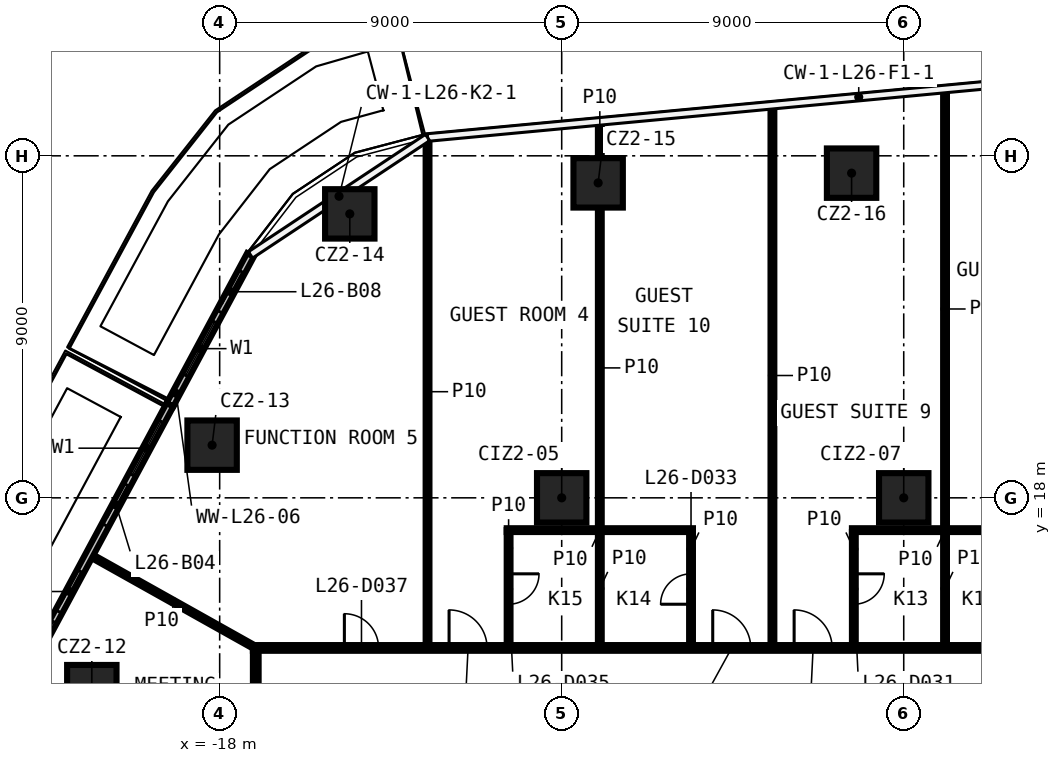
"""IFC4 building model, lengths in metres.
Left out: names, types, materials, properties, quantities, classifications, styles, units other than length and angle.
Written with IfcOpenShell. Run it as: python <this file> out.ifc"""

import sys

from ifc_helpers import new_model, si_unit, direction, frame, frame_2d, origin, origin_2d, place, context, subcontext, project, spatial, rectangle, extrude, element, fill, save


model = new_model("IFC4")
c1 = context("Model", 3, precision=1e-05, world=origin(), true_north=direction((0.0, 1.0)))
c2 = subcontext(c1, "Body", "Model", "MODEL_VIEW")
j1 = project(units=[si_unit("LENGTHUNIT", "METRE"), si_unit("PLANEANGLEUNIT", "RADIAN")], contexts=[c1])
p1 = place(None, origin())
s1 = spatial("IfcSite", under=j1, at=p1, CompositionType="ELEMENT")
p2 = place(p1, origin())
s2 = spatial("IfcBuilding", under=s1, at=p2, CompositionType="ELEMENT")
p3 = place(p2, frame((0.0, 0.0, 121.1)))
s3 = spatial("IfcBuildingStorey", under=s2, at=p3, CompositionType="ELEMENT", Elevation=121.1)
for number, where, z_axis, x_axis in (
    (1, (-21.364, 12.952, 0.0), (0.0, 0.0, 1.0), (1.0, 0.0, 0.0)),
    (2, (-18.199, 19.386, 0.0), (0.0, 0.0, 1.0), (1.0, 0.0, 0.0)),
    (3, (-14.576, 25.472, 0.0), (0.0, 0.0, 1.0), (1.0, 0.0, 0.0)),
    (4, (-8.041, 26.288, 0.0), (0.0, 0.0, 1.0), (1.0, 0.0, 0.0)),
    (5, (-1.372, 26.544, 0.0), (0.0, 0.0, 1.0), (1.0, 0.0, 0.0)),
    (6, (-9.0, 18.0, 0.0), (0.0, 0.0, 1.0), (1.0, 0.0, 0.0)),
    (7, (0.0, 18.0, 0.0), (0.0, 0.0, 1.0), (1.0, 0.0, 0.0)),
):
    element("IfcColumn", number, at=place(p3, frame(where, z_axis=z_axis, x_axis=x_axis)), inside=s3, PredefinedType="COLUMN", context=c2, shape_type="SweptSolid", body=[
        extrude(rectangle(XDim=1.3, YDim=1.3, at=origin_2d()), origin(), (0.0, 0.0, 1.0), 3.3),
    ])
p4 = place(p3, frame((-17.125, 14.05, 0.0), z_axis=(0.0, 0.0, 1.0), x_axis=(1.0, 0.0, 0.0)))
e8 = element("IfcWall", 8, at=p4, inside=s3, PredefinedType="PARTITIONING", context=c2, shape_type="SweptSolid", body=[
    extrude(rectangle(XDim=34.25, YDim=0.15, at=frame_2d((17.125, 0.0))), origin(), (0.0, 0.0, 1.0), 3.3),
])
p5 = place(p4, frame((30.377, 0.0, 0.0)))
e9 = element("IfcOpeningElement", 9, at=p5, cuts=e8, PredefinedType="OPENING", context=c2, shape_type="SweptSolid", body=[
    extrude(rectangle(XDim=0.9, YDim=2.1, at=frame_2d((0.45, 1.05))), frame((0.0, 0.085, 0.0), z_axis=(0.0, -1.0, 0.0), x_axis=(1.0, 0.0, 0.0)), (0.0, 0.0, 1.0), 0.17),
])
p6 = place(p4, frame((23.321, 0.0, 0.0)))
e10 = element("IfcOpeningElement", 10, at=p6, cuts=e8, PredefinedType="OPENING", context=c2, shape_type="SweptSolid", body=[
    extrude(rectangle(XDim=1.0, YDim=2.1, at=frame_2d((0.5, 1.05))), frame((0.0, 0.085, 0.0), z_axis=(0.0, -1.0, 0.0), x_axis=(1.0, 0.0, 0.0)), (0.0, 0.0, 1.0), 0.17),
])
p7 = place(p4, frame((21.183, 0.0, 0.0)))
e11 = element("IfcOpeningElement", 11, at=p7, cuts=e8, PredefinedType="OPENING", context=c2, shape_type="SweptSolid", body=[
    extrude(rectangle(XDim=1.0, YDim=2.1, at=frame_2d((0.5, 1.05))), frame((0.0, 0.085, 0.0), z_axis=(0.0, -1.0, 0.0), x_axis=(1.0, 0.0, 0.0)), (0.0, 0.0, 1.0), 0.17),
])
p8 = place(p4, frame((14.241, 0.0, 0.0)))
e12 = element("IfcOpeningElement", 12, at=p8, cuts=e8, PredefinedType="OPENING", context=c2, shape_type="SweptSolid", body=[
    extrude(rectangle(XDim=1.0, YDim=2.1, at=frame_2d((0.5, 1.05))), frame((0.0, 0.085, 0.0), z_axis=(0.0, -1.0, 0.0), x_axis=(1.0, 0.0, 0.0)), (0.0, 0.0, 1.0), 0.17),
])
p9 = place(p4, frame((12.099, 0.0, 0.0)))
e13 = element("IfcOpeningElement", 13, at=p9, cuts=e8, PredefinedType="OPENING", context=c2, shape_type="SweptSolid", body=[
    extrude(rectangle(XDim=1.0, YDim=2.1, at=frame_2d((0.5, 1.05))), frame((0.0, 0.085, 0.0), z_axis=(0.0, -1.0, 0.0), x_axis=(1.0, 0.0, 0.0)), (0.0, 0.0, 1.0), 0.17),
])
p10 = place(p4, frame((5.161, 0.0, 0.0)))
e14 = element("IfcOpeningElement", 14, at=p10, cuts=e8, PredefinedType="OPENING", context=c2, shape_type="SweptSolid", body=[
    extrude(rectangle(XDim=1.0, YDim=2.1, at=frame_2d((0.5, 1.05))), frame((0.0, 0.085, 0.0), z_axis=(0.0, -1.0, 0.0), x_axis=(1.0, 0.0, 0.0)), (0.0, 0.0, 1.0), 0.17),
])
p11 = place(p4, frame((2.406, 0.0, 0.0)))
e15 = element("IfcOpeningElement", 15, at=p11, cuts=e8, PredefinedType="OPENING", context=c2, shape_type="SweptSolid", body=[
    extrude(rectangle(XDim=0.9, YDim=2.1, at=frame_2d((0.45, 1.05))), frame((0.0, 0.085, 0.0), z_axis=(0.0, -1.0, 0.0), x_axis=(1.0, 0.0, 0.0)), (0.0, 0.0, 1.0), 0.17),
])
p12 = place(p3, frame((-10.447, 17.15, 0.0), z_axis=(0.0, 0.0, 1.0), x_axis=(1.0, 0.0, 0.0)))
e16 = element("IfcWall", 16, at=p12, inside=s3, PredefinedType="PARTITIONING", context=c2, shape_type="SweptSolid", body=[
    extrude(rectangle(XDim=4.9, YDim=0.1, at=frame_2d((2.45, 0.0))), origin(), (0.0, 0.0, 1.0), 3.3),
])
p13 = place(p3, frame((-1.363, 17.15, 0.0), z_axis=(0.0, 0.0, 1.0), x_axis=(1.0, 0.0, 0.0)))
e17 = element("IfcWall", 17, at=p13, inside=s3, PredefinedType="PARTITIONING", context=c2, shape_type="SweptSolid", body=[
    extrude(rectangle(XDim=4.9, YDim=0.1, at=frame_2d((2.45, 0.0))), origin(), (0.0, 0.0, 1.0), 3.3),
])
p14 = place(p3, frame((1.087, 14.125, 0.0), z_axis=(0.0, 0.0, 1.0), x_axis=(0.0, 1.0, 0.0)))
e18 = element("IfcWall", 18, at=p14, inside=s3, PredefinedType="PARTITIONING", context=c2, shape_type="SweptSolid", body=[
    extrude(rectangle(XDim=2.975, YDim=0.1, at=frame_2d((1.488, 0.0))), origin(), (0.0, 0.0, 1.0), 3.3),
])
p15 = place(p3, frame((1.087, 17.2, 0.0), z_axis=(0.0, 0.0, 1.0), x_axis=(0.0, 1.0, 0.0)))
e19 = element("IfcWall", 19, at=p15, inside=s3, PredefinedType="PARTITIONING", context=c2, shape_type="SweptSolid", body=[
    extrude(rectangle(XDim=11.539, YDim=0.1, at=frame_2d((5.77, 0.0))), origin(), (0.0, 0.0, 1.0), 3.3),
])
p16 = place(p3, frame((-1.313, 17.1, 0.0), z_axis=(0.0, 0.0, 1.0), x_axis=(0.0, -1.0, 0.0)))
e20 = element("IfcWall", 20, at=p16, inside=s3, PredefinedType="PARTITIONING", context=c2, shape_type="SweptSolid", body=[
    extrude(rectangle(XDim=2.975, YDim=0.1, at=frame_2d((1.488, 0.0))), origin(), (0.0, 0.0, 1.0), 3.3),
])
p17 = place(p16, frame((1.1, 0.0, 0.0)))
e21 = element("IfcOpeningElement", 21, at=p17, cuts=e20, PredefinedType="OPENING", context=c2, shape_type="SweptSolid", body=[
    extrude(rectangle(XDim=0.8, YDim=2.1, at=frame_2d((0.4, 1.05))), frame((0.0, 0.06, 0.0), z_axis=(0.0, -1.0, 0.0), x_axis=(1.0, 0.0, 0.0)), (0.0, 0.0, 1.0), 0.12),
])
p18 = place(p3, frame((-3.455, 14.125, 0.0), z_axis=(0.0, 0.0, 1.0), x_axis=(0.0, 1.0, 0.0)))
e22 = element("IfcWall", 22, at=p18, inside=s3, PredefinedType="PARTITIONING", context=c2, shape_type="SweptSolid", body=[
    extrude(rectangle(XDim=14.188, YDim=0.1, at=frame_2d((7.094, 0.0))), origin(), (0.0, 0.0, 1.0), 3.3),
])
p19 = place(p3, frame((-5.597, 14.125, 0.0), z_axis=(0.0, 0.0, 1.0), x_axis=(0.0, 1.0, 0.0)))
e23 = element("IfcWall", 23, at=p19, inside=s3, PredefinedType="PARTITIONING", context=c2, shape_type="SweptSolid", body=[
    extrude(rectangle(XDim=2.975, YDim=0.1, at=frame_2d((1.488, 0.0))), origin(), (0.0, 0.0, 1.0), 3.3),
])
p20 = place(p19, frame((1.075, 0.0, 0.0)))
e24 = element("IfcOpeningElement", 24, at=p20, cuts=e23, PredefinedType="OPENING", context=c2, shape_type="SweptSolid", body=[
    extrude(rectangle(XDim=0.8, YDim=2.1, at=frame_2d((0.4, 1.05))), frame((0.0, 0.06, 0.0), z_axis=(0.0, -1.0, 0.0), x_axis=(1.0, 0.0, 0.0)), (0.0, 0.0, 1.0), 0.12),
])
p21 = place(p3, frame((-7.997, 14.125, 0.0), z_axis=(0.0, 0.0, 1.0), x_axis=(0.0, 1.0, 0.0)))
e25 = element("IfcWall", 25, at=p21, inside=s3, PredefinedType="PARTITIONING", context=c2, shape_type="SweptSolid", body=[
    extrude(rectangle(XDim=2.975, YDim=0.1, at=frame_2d((1.488, 0.0))), origin(), (0.0, 0.0, 1.0), 3.3),
])
p22 = place(p3, frame((-7.997, 17.2, 0.0), z_axis=(0.0, 0.0, 1.0), x_axis=(0.0, 1.0, 0.0)))
e26 = element("IfcWall", 26, at=p22, inside=s3, PredefinedType="PARTITIONING", context=c2, shape_type="SweptSolid", body=[
    extrude(rectangle(XDim=8.438, YDim=0.1, at=frame_2d((4.219, 0.0))), origin(), (0.0, 0.0, 1.0), 3.3),
])
p23 = place(p3, frame((-7.997, 26.938, 0.0), z_axis=(0.0, 0.0, 1.0), x_axis=(0.0, 1.0, 0.0)))
e27 = element("IfcWall", 27, at=p23, inside=s3, PredefinedType="PARTITIONING", context=c2, shape_type="SweptSolid", body=[
    extrude(rectangle(XDim=0.949, YDim=0.1, at=frame_2d((0.474, 0.0))), origin(), (0.0, 0.0, 1.0), 3.3),
])
p24 = place(p3, frame((-10.397, 17.15, 0.0), z_axis=(0.0, 0.0, 1.0), x_axis=(0.0, -1.0, 0.0)))
e28 = element("IfcWall", 28, at=p24, inside=s3, PredefinedType="PARTITIONING", context=c2, shape_type="SweptSolid", body=[
    extrude(rectangle(XDim=3.025, YDim=0.1, at=frame_2d((1.512, 0.0))), origin(), (0.0, 0.0, 1.0), 3.3),
])
p25 = place(p24, frame((1.15, 0.0, 0.0)))
e29 = element("IfcOpeningElement", 29, at=p25, cuts=e28, PredefinedType="OPENING", context=c2, shape_type="SweptSolid", body=[
    extrude(rectangle(XDim=0.8, YDim=2.1, at=frame_2d((0.4, 1.05))), frame((0.0, 0.06, 0.0), z_axis=(0.0, -1.0, 0.0), x_axis=(1.0, 0.0, 0.0)), (0.0, 0.0, 1.0), 0.12),
])
p26 = place(p3, frame((-12.53, 14.125, 0.0), z_axis=(0.0, 0.0, 1.0), x_axis=(0.0, 1.0, 0.0)))
e30 = element("IfcWall", 30, at=p26, inside=s3, PredefinedType="PARTITIONING", context=c2, shape_type="SweptSolid", body=[
    extrude(rectangle(XDim=13.336, YDim=0.1, at=frame_2d((6.668, 0.0))), origin(), (0.0, 0.0, 1.0), 3.3),
])
p27 = place(p3, frame((-17.05, -13.975, 0.0), z_axis=(0.0, 0.0, 1.0), x_axis=(0.0, 1.0, 0.0)))
e31 = element("IfcWall", 31, at=p27, inside=s3, PredefinedType="PARTITIONING", context=c2, shape_type="SweptSolid", body=[
    extrude(rectangle(XDim=27.95, YDim=0.15, at=frame_2d((13.975, 0.0))), origin(), (0.0, 0.0, 1.0), 3.3),
])
p28 = place(p27, frame((11.186, 0.0, 0.0)))
e32 = element("IfcOpeningElement", 32, at=p28, cuts=e31, PredefinedType="OPENING", context=c2, shape_type="SweptSolid", body=[
    extrude(rectangle(XDim=0.9, YDim=2.1, at=frame_2d((0.45, 1.05))), frame((0.0, 0.085, 0.0), z_axis=(0.0, -1.0, 0.0), x_axis=(1.0, 0.0, 0.0)), (0.0, 0.0, 1.0), 0.17),
])
p29 = place(p27, frame((8.404, 0.0, 0.0)))
e33 = element("IfcOpeningElement", 33, at=p29, cuts=e31, PredefinedType="OPENING", context=c2, shape_type="SweptSolid", body=[
    extrude(rectangle(XDim=0.9, YDim=2.1, at=frame_2d((0.45, 1.05))), frame((0.0, 0.085, 0.0), z_axis=(0.0, -1.0, 0.0), x_axis=(1.0, 0.0, 0.0)), (0.0, 0.0, 1.0), 0.17),
])
p30 = place(p27, frame((1.58, 0.0, 0.0)))
e34 = element("IfcOpeningElement", 34, at=p30, cuts=e31, PredefinedType="OPENING", context=c2, shape_type="SweptSolid", body=[
    extrude(rectangle(XDim=0.9, YDim=2.1, at=frame_2d((0.45, 1.05))), frame((0.0, 0.085, 0.0), z_axis=(0.0, -1.0, 0.0), x_axis=(1.0, 0.0, 0.0)), (0.0, 0.0, 1.0), 0.17),
])
p31 = place(p27, frame((24.871, 0.0, 0.0)))
e35 = element("IfcOpeningElement", 35, at=p31, cuts=e31, PredefinedType="OPENING", context=c2, shape_type="SweptSolid", body=[
    extrude(rectangle(XDim=0.9, YDim=2.1, at=frame_2d((0.45, 1.05))), frame((0.0, 0.085, 0.0), z_axis=(0.0, -1.0, 0.0), x_axis=(1.0, 0.0, 0.0)), (0.0, 0.0, 1.0), 0.17),
])
p32 = place(p27, frame((20.159, 0.0, 0.0)))
e36 = element("IfcOpeningElement", 36, at=p32, cuts=e31, PredefinedType="OPENING", context=c2, shape_type="SweptSolid", body=[
    extrude(rectangle(XDim=0.9, YDim=2.1, at=frame_2d((0.45, 1.05))), frame((0.0, 0.085, 0.0), z_axis=(0.0, -1.0, 0.0), x_axis=(1.0, 0.0, 0.0)), (0.0, 0.0, 1.0), 0.17),
])
p33 = place(p27, frame((16.211, 0.0, 0.0)))
e37 = element("IfcOpeningElement", 37, at=p33, cuts=e31, PredefinedType="OPENING", context=c2, shape_type="SweptSolid", body=[
    extrude(rectangle(XDim=0.9, YDim=2.1, at=frame_2d((0.45, 1.05))), frame((0.0, 0.085, 0.0), z_axis=(0.0, -1.0, 0.0), x_axis=(1.0, 0.0, 0.0)), (0.0, 0.0, 1.0), 0.17),
])
p34 = place(p3, frame((-21.411, 16.494, 0.0), z_axis=(0.0, 0.0, 1.0), x_axis=(0.872342728858, -0.488894838803, 0.0)))
e38 = element("IfcWall", 38, at=p34, inside=s3, PredefinedType="PARTITIONING", context=c2, shape_type="SweptSolid", body=[
    extrude(rectangle(XDim=4.999, YDim=0.1, at=frame_2d((2.5, 0.0))), origin(), (0.0, 0.0, 1.0), 3.3),
])
p35 = place(p3, frame((-19.306, 20.451, 0.0), z_axis=(0.0, 0.0, 1.0), x_axis=(-0.473410228211, -0.880842072011, 0.0)))
e39 = element("IfcWall", 39, at=p35, inside=s3, PredefinedType="SOLIDWALL", context=c2, shape_type="SweptSolid", body=[
    extrude(rectangle(XDim=17.928, YDim=0.2, at=frame_2d((8.964, 0.0))), origin(), (0.0, 0.0, 1.0), 3.3),
])
p36 = place(p35, frame((0.5, 0.0, 0.6)))
e40 = element("IfcOpeningElement", 40, at=p36, cuts=e39, PredefinedType="OPENING", context=c2, shape_type="SweptSolid", body=[
    extrude(rectangle(XDim=1.6, YDim=2.4, at=frame_2d((0.8, 1.2))), frame((0.0, 0.11, 0.0), z_axis=(0.0, -1.0, 0.0), x_axis=(1.0, 0.0, 0.0)), (0.0, 0.0, 1.0), 0.22),
])
p37 = place(p35, frame((2.4, 0.0, 0.0)))
e41 = element("IfcOpeningElement", 41, at=p37, cuts=e39, PredefinedType="OPENING", context=c2, shape_type="SweptSolid", body=[
    extrude(rectangle(XDim=1.2, YDim=2.4, at=frame_2d((0.6, 1.2))), frame((0.0, 0.11, 0.0), z_axis=(0.0, -1.0, 0.0), x_axis=(1.0, 0.0, 0.0)), (0.0, 0.0, 1.0), 0.22),
])
p38 = place(p35, frame((6.482, 0.0, 0.6)))
e42 = element("IfcOpeningElement", 42, at=p38, cuts=e39, PredefinedType="OPENING", context=c2, shape_type="SweptSolid", body=[
    extrude(rectangle(XDim=1.6, YDim=2.4, at=frame_2d((0.8, 1.2))), frame((0.0, 0.11, 0.0), z_axis=(0.0, -1.0, 0.0), x_axis=(1.0, 0.0, 0.0)), (0.0, 0.0, 1.0), 0.22),
])
p39 = place(p35, frame((4.982, 0.0, 0.0)))
e43 = element("IfcOpeningElement", 43, at=p39, cuts=e39, PredefinedType="OPENING", context=c2, shape_type="SweptSolid", body=[
    extrude(rectangle(XDim=1.2, YDim=2.4, at=frame_2d((0.6, 1.2))), frame((0.0, 0.11, 0.0), z_axis=(0.0, -1.0, 0.0), x_axis=(1.0, 0.0, 0.0)), (0.0, 0.0, 1.0), 0.22),
])
p40 = place(p35, frame((10.964, 0.0, 0.6)))
e44 = element("IfcOpeningElement", 44, at=p40, cuts=e39, PredefinedType="OPENING", context=c2, shape_type="SweptSolid", body=[
    extrude(rectangle(XDim=1.6, YDim=2.4, at=frame_2d((0.8, 1.2))), frame((0.0, 0.11, 0.0), z_axis=(0.0, -1.0, 0.0), x_axis=(1.0, 0.0, 0.0)), (0.0, 0.0, 1.0), 0.22),
])
p41 = place(p35, frame((9.464, 0.0, 0.0)))
e45 = element("IfcOpeningElement", 45, at=p41, cuts=e39, PredefinedType="OPENING", context=c2, shape_type="SweptSolid", body=[
    extrude(rectangle(XDim=1.2, YDim=2.4, at=frame_2d((0.6, 1.2))), frame((0.0, 0.11, 0.0), z_axis=(0.0, -1.0, 0.0), x_axis=(1.0, 0.0, 0.0)), (0.0, 0.0, 1.0), 0.22),
])
p42 = place(p35, frame((13.946, 0.0, 0.6)))
e46 = element("IfcOpeningElement", 46, at=p42, cuts=e39, PredefinedType="OPENING", context=c2, shape_type="SweptSolid", body=[
    extrude(rectangle(XDim=1.6, YDim=2.4, at=frame_2d((0.8, 1.2))), frame((0.0, 0.11, 0.0), z_axis=(0.0, -1.0, 0.0), x_axis=(1.0, 0.0, 0.0)), (0.0, 0.0, 1.0), 0.22),
])
p43 = place(p35, frame((15.846, 0.0, 0.0)))
e47 = element("IfcOpeningElement", 47, at=p43, cuts=e39, PredefinedType="OPENING", context=c2, shape_type="SweptSolid", body=[
    extrude(rectangle(XDim=1.2, YDim=2.4, at=frame_2d((0.6, 1.2))), frame((0.0, 0.11, 0.0), z_axis=(0.0, -1.0, 0.0), x_axis=(1.0, 0.0, 0.0)), (0.0, 0.0, 1.0), 0.22),
])
p44 = place(p3, frame((-17.188, 24.392, 0.0), z_axis=(0.0, 0.0, 1.0), x_axis=(-0.473387015207, -0.88085454749, 0.0)))
e48 = element("IfcWall", 48, at=p44, inside=s3, PredefinedType="SOLIDWALL", context=c2, shape_type="SweptSolid", body=[
    extrude(rectangle(XDim=4.474, YDim=0.2, at=frame_2d((2.237, 0.0))), origin(), (0.0, 0.0, 1.0), 3.3),
])
p45 = place(p44, frame((2.0, 0.0, 0.6)))
e49 = element("IfcOpeningElement", 49, at=p45, cuts=e48, PredefinedType="OPENING", context=c2, shape_type="SweptSolid", body=[
    extrude(rectangle(XDim=1.6, YDim=2.4, at=frame_2d((0.8, 1.2))), frame((0.0, 0.11, 0.0), z_axis=(0.0, -1.0, 0.0), x_axis=(1.0, 0.0, 0.0)), (0.0, 0.0, 1.0), 0.22),
])
p46 = place(p44, frame((0.5, 0.0, 0.0)))
e50 = element("IfcOpeningElement", 50, at=p46, cuts=e48, PredefinedType="OPENING", context=c2, shape_type="SweptSolid", body=[
    extrude(rectangle(XDim=1.2, YDim=2.4, at=frame_2d((0.6, 1.2))), frame((0.0, 0.11, 0.0), z_axis=(0.0, -1.0, 0.0), x_axis=(1.0, 0.0, 0.0)), (0.0, 0.0, 1.0), 0.22),
])
p47 = place(p17, origin())
e51 = element("IfcDoor", 51, at=p47, inside=s3, OperationType="SINGLE_SWING_LEFT", PredefinedType="DOOR", context=c2, shape_type="SweptSolid", body=[
    extrude(rectangle(XDim=0.8, YDim=2.1, at=frame_2d((0.4, 1.05))), frame((0.0, 0.025, 0.0), z_axis=(0.0, -1.0, 0.0), x_axis=(1.0, 0.0, 0.0)), (0.0, 0.0, 1.0), 0.05),
])
fill(e21, e51)
p48 = place(p8, origin())
e52 = element("IfcDoor", 52, at=p48, inside=s3, OperationType="SINGLE_SWING_RIGHT", PredefinedType="DOOR", context=c2, shape_type="SweptSolid", body=[
    extrude(rectangle(XDim=1.0, YDim=2.1, at=frame_2d((0.5, 1.05))), frame((0.0, 0.025, 0.0), z_axis=(0.0, -1.0, 0.0), x_axis=(1.0, 0.0, 0.0)), (0.0, 0.0, 1.0), 0.05),
])
fill(e12, e52)
p49 = place(p20, origin())
e53 = element("IfcDoor", 53, at=p49, inside=s3, OperationType="SINGLE_SWING_RIGHT", PredefinedType="DOOR", context=c2, shape_type="SweptSolid", body=[
    extrude(rectangle(XDim=0.8, YDim=2.1, at=frame_2d((0.4, 1.05))), frame((0.0, 0.025, 0.0), z_axis=(0.0, -1.0, 0.0), x_axis=(1.0, 0.0, 0.0)), (0.0, 0.0, 1.0), 0.05),
])
fill(e24, e53)
p50 = place(p9, origin())
e54 = element("IfcDoor", 54, at=p50, inside=s3, OperationType="SINGLE_SWING_LEFT", PredefinedType="DOOR", context=c2, shape_type="SweptSolid", body=[
    extrude(rectangle(XDim=1.0, YDim=2.1, at=frame_2d((0.5, 1.05))), frame((0.0, 0.025, 0.0), z_axis=(0.0, -1.0, 0.0), x_axis=(1.0, 0.0, 0.0)), (0.0, 0.0, 1.0), 0.05),
])
fill(e13, e54)
p51 = place(p25, origin())
e55 = element("IfcDoor", 55, at=p51, inside=s3, OperationType="SINGLE_SWING_LEFT", PredefinedType="DOOR", context=c2, shape_type="SweptSolid", body=[
    extrude(rectangle(XDim=0.8, YDim=2.1, at=frame_2d((0.4, 1.05))), frame((0.0, 0.025, 0.0), z_axis=(0.0, -1.0, 0.0), x_axis=(1.0, 0.0, 0.0)), (0.0, 0.0, 1.0), 0.05),
])
fill(e29, e55)
p52 = place(p10, origin())
e56 = element("IfcDoor", 56, at=p52, inside=s3, OperationType="SINGLE_SWING_RIGHT", PredefinedType="DOOR", context=c2, shape_type="SweptSolid", body=[
    extrude(rectangle(XDim=1.0, YDim=2.1, at=frame_2d((0.5, 1.05))), frame((0.0, 0.025, 0.0), z_axis=(0.0, -1.0, 0.0), x_axis=(1.0, 0.0, 0.0)), (0.0, 0.0, 1.0), 0.05),
])
fill(e14, e56)
p53 = place(p11, origin())
e57 = element("IfcDoor", 57, at=p53, inside=s3, OperationType="SINGLE_SWING_LEFT", PredefinedType="DOOR", context=c2, shape_type="SweptSolid", body=[
    extrude(rectangle(XDim=0.9, YDim=2.1, at=frame_2d((0.45, 1.05))), frame((0.0, 0.025, 0.0), z_axis=(0.0, -1.0, 0.0), x_axis=(1.0, 0.0, 0.0)), (0.0, 0.0, 1.0), 0.05),
])
fill(e15, e57)
p54 = place(p36, origin())
e58 = element("IfcWindow", 58, at=p54, inside=s3, PartitioningType="SINGLE_PANEL", PredefinedType="WINDOW", context=c2, shape_type="SweptSolid", body=[
    extrude(rectangle(XDim=1.6, YDim=2.4, at=frame_2d((0.8, 1.2))), frame((0.0, 0.03, 0.0), z_axis=(0.0, -1.0, 0.0), x_axis=(1.0, 0.0, 0.0)), (0.0, 0.0, 1.0), 0.06),
])
fill(e40, e58)
p55 = place(p37, origin())
e59 = element("IfcDoor", 59, at=p55, inside=s3, OperationType="SLIDING_TO_LEFT", PredefinedType="DOOR", context=c2, shape_type="SweptSolid", body=[
    extrude(rectangle(XDim=1.2, YDim=2.4, at=frame_2d((0.6, 1.2))), frame((0.0, 0.025, 0.0), z_axis=(0.0, -1.0, 0.0), x_axis=(1.0, 0.0, 0.0)), (0.0, 0.0, 1.0), 0.05),
])
fill(e41, e59)
p56 = place(p38, origin())
e60 = element("IfcWindow", 60, at=p56, inside=s3, PartitioningType="SINGLE_PANEL", PredefinedType="WINDOW", context=c2, shape_type="SweptSolid", body=[
    extrude(rectangle(XDim=1.6, YDim=2.4, at=frame_2d((0.8, 1.2))), frame((0.0, 0.03, 0.0), z_axis=(0.0, -1.0, 0.0), x_axis=(1.0, 0.0, 0.0)), (0.0, 0.0, 1.0), 0.06),
])
fill(e42, e60)
p57 = place(p39, origin())
e61 = element("IfcDoor", 61, at=p57, inside=s3, OperationType="SLIDING_TO_LEFT", PredefinedType="DOOR", context=c2, shape_type="SweptSolid", body=[
    extrude(rectangle(XDim=1.2, YDim=2.4, at=frame_2d((0.6, 1.2))), frame((0.0, 0.025, 0.0), z_axis=(0.0, -1.0, 0.0), x_axis=(1.0, 0.0, 0.0)), (0.0, 0.0, 1.0), 0.05),
])
fill(e43, e61)
p58 = place(p45, origin())
e62 = element("IfcWindow", 62, at=p58, inside=s3, PartitioningType="SINGLE_PANEL", PredefinedType="WINDOW", context=c2, shape_type="SweptSolid", body=[
    extrude(rectangle(XDim=1.6, YDim=2.4, at=frame_2d((0.8, 1.2))), frame((0.0, 0.03, 0.0), z_axis=(0.0, -1.0, 0.0), x_axis=(1.0, 0.0, 0.0)), (0.0, 0.0, 1.0), 0.06),
])
fill(e49, e62)
p59 = place(p46, origin())
e63 = element("IfcDoor", 63, at=p59, inside=s3, OperationType="SLIDING_TO_LEFT", PredefinedType="DOOR", context=c2, shape_type="SweptSolid", body=[
    extrude(rectangle(XDim=1.2, YDim=2.4, at=frame_2d((0.6, 1.2))), frame((0.0, 0.025, 0.0), z_axis=(0.0, -1.0, 0.0), x_axis=(1.0, 0.0, 0.0)), (0.0, 0.0, 1.0), 0.05),
])
fill(e50, e63)
save(model, sys.argv[1])
